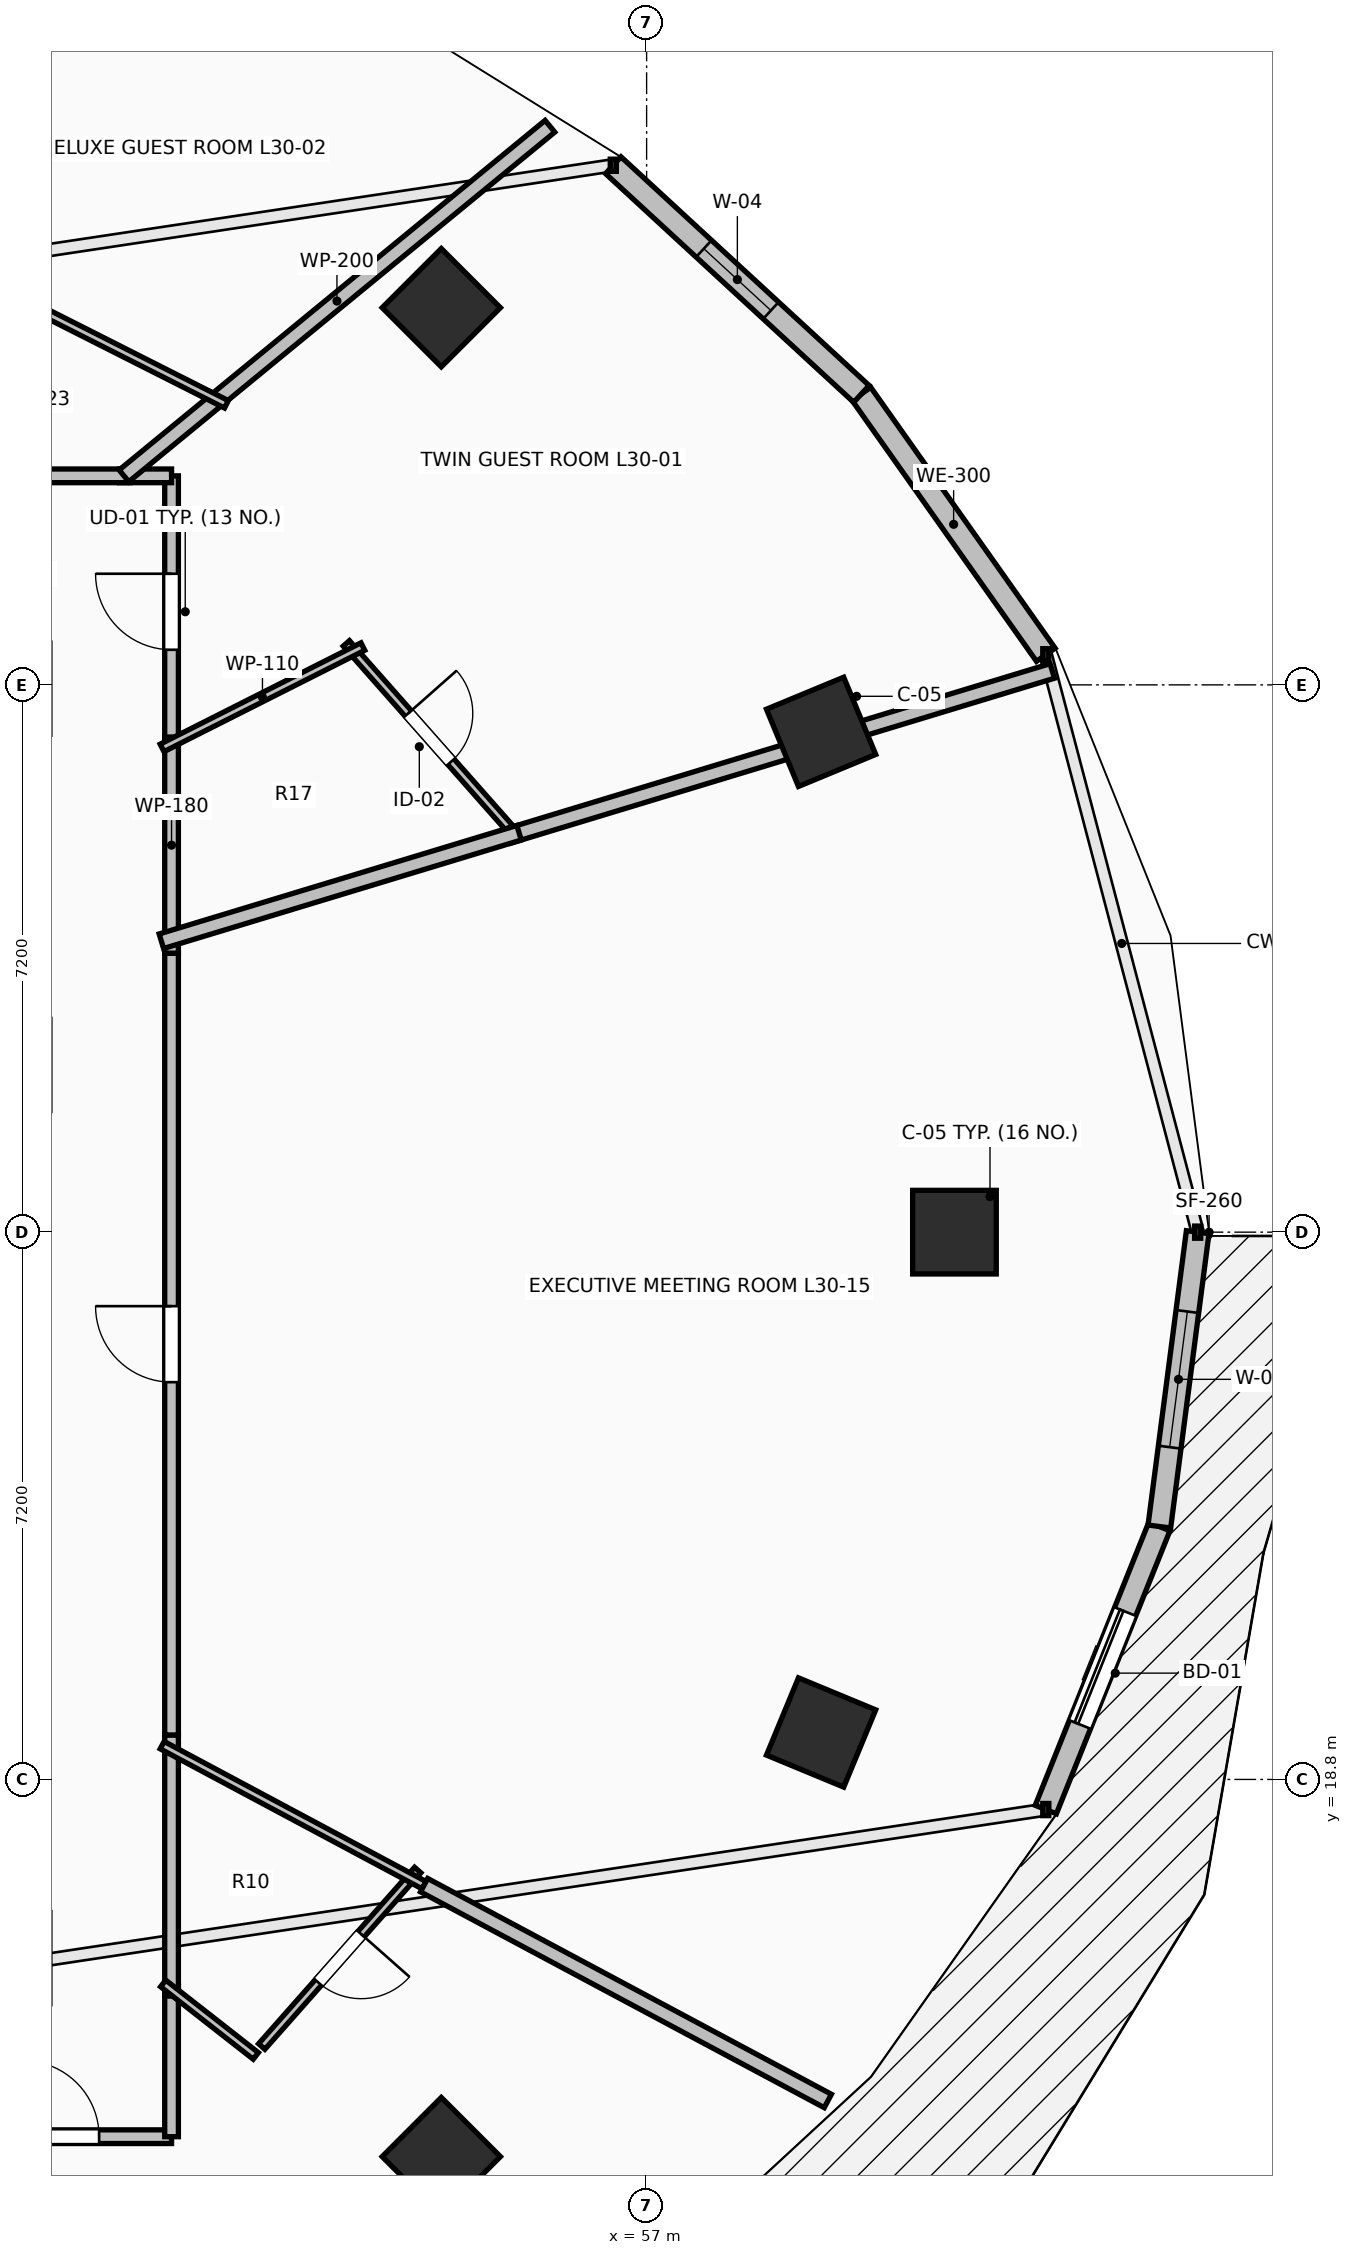
"""IFC4 building model, lengths in metres.
Left out: names, types, materials, properties, quantities, classifications, styles, units other than length and angle.
Written with IfcOpenShell. Run it as: python <this file> out.ifc"""

import sys

from ifc_helpers import new_model, si_unit, direction, frame, frame_2d, origin, origin_2d, place, context, subcontext, project, spatial, rectangle, extrude, element, fill, save


model = new_model("IFC4")
c1 = context("Model", 3, precision=1e-05, world=origin(), true_north=direction((0.0, 1.0)))
c2 = subcontext(c1, "Body", "Model", "MODEL_VIEW")
j1 = project(units=[si_unit("LENGTHUNIT", "METRE"), si_unit("PLANEANGLEUNIT", "RADIAN")], contexts=[c1])
p1 = place(None, origin())
s1 = spatial("IfcSite", under=j1, at=p1, CompositionType="ELEMENT")
p2 = place(p1, origin())
s2 = spatial("IfcBuilding", under=s1, at=p2, CompositionType="ELEMENT")
p3 = place(p2, frame((0.0, 0.0, 113.8)))
s3 = spatial("IfcBuildingStorey", under=s2, at=p3, CompositionType="ELEMENT", Elevation=113.8)
for number, where, z_axis, x_axis in (
    (1, (61.05, 26.0, 0.0), (0.0, 0.0, 1.0), (1.0, 0.0, 0.0)),
    (2, (59.295, 32.582, 0.0), (0.0, 0.0, 1.0), (0.924, 0.383, 0.0)),
    (3, (54.299, 38.162, 0.0), (0.0, 0.0, 1.0), (0.707, 0.707, 0.0)),
    (4, (54.299, 13.838, 0.0), (0.0, 0.0, 1.0), (0.707, -0.707, 0.0)),
    (5, (59.295, 19.418, 0.0), (0.0, 0.0, 1.0), (0.924, -0.383, 0.0)),
):
    element("IfcColumn", number, at=place(p3, frame(where, z_axis=z_axis, x_axis=x_axis)), inside=s3, PredefinedType="COLUMN", context=c2, shape_type="SweptSolid", body=[
        extrude(rectangle(XDim=1.1, YDim=1.1, at=origin_2d()), origin(), (0.0, 0.0, 1.0), 3.5),
    ])
p4 = place(p3, frame((62.252, 33.596, 0.0), z_axis=(0.0, 0.0, 1.0), x_axis=(-0.57716435238, 0.81662801222, 0.0)))
e6 = element("IfcWall", 6, at=p4, inside=s3, PredefinedType="STANDARD", context=c2, shape_type="SweptSolid", body=[
    extrude(rectangle(XDim=4.202, YDim=0.3, at=frame_2d((2.101, 0.0))), origin(), (0.0, 0.0, 1.0), 3.24),
])
p5 = place(p3, frame((59.826, 37.028, 0.0), z_axis=(0.0, 0.0, 1.0), x_axis=(-0.735416718093, 0.677615119924, 0.0)))
e7 = element("IfcWall", 7, at=p5, inside=s3, PredefinedType="STANDARD", context=c2, shape_type="SweptSolid", body=[
    extrude(rectangle(XDim=4.439, YDim=0.3, at=frame_2d((2.22, 0.0))), origin(), (0.0, 0.0, 1.0), 3.24),
])
p6 = place(p5, frame((1.619, 0.0, 0.85)))
e8 = element("IfcOpeningElement", 8, at=p6, cuts=e7, PredefinedType="OPENING", context=c2, shape_type="SweptSolid", body=[
    extrude(rectangle(XDim=1.2, YDim=1.95, at=frame_2d((0.6, 0.975))), frame((0.0, 0.165, 0.0), z_axis=(0.0, -1.0, 0.0), x_axis=(1.0, 0.0, 0.0)), (0.0, 0.0, 1.0), 0.33),
])
p7 = place(p3, frame((62.252, 18.404, 0.0), z_axis=(0.0, 0.0, 1.0), x_axis=(0.372345205928, 0.92809430966, 0.0)))
e9 = element("IfcWall", 9, at=p7, inside=s3, PredefinedType="STANDARD", context=c2, shape_type="SweptSolid", body=[
    extrude(rectangle(XDim=4.012, YDim=0.3, at=frame_2d((2.006, 0.0))), origin(), (0.0, 0.0, 1.0), 3.24),
])
p8 = place(p7, frame((1.206, 0.0, 0.0)))
e10 = element("IfcOpeningElement", 10, at=p8, cuts=e9, PredefinedType="OPENING", context=c2, shape_type="SweptSolid", body=[
    extrude(rectangle(XDim=1.6, YDim=2.3, at=frame_2d((0.8, 1.15))), frame((0.0, 0.165, 0.0), z_axis=(0.0, -1.0, 0.0), x_axis=(1.0, 0.0, 0.0)), (0.0, 0.0, 1.0), 0.33),
])
p9 = place(p3, frame((63.746, 22.127, 0.0), z_axis=(0.0, 0.0, 1.0), x_axis=(0.129157444793, 0.991624099372, 0.0)))
e11 = element("IfcWall", 11, at=p9, inside=s3, PredefinedType="STANDARD", context=c2, shape_type="SweptSolid", body=[
    extrude(rectangle(XDim=3.905, YDim=0.3, at=frame_2d((1.953, 0.0))), origin(), (0.0, 0.0, 1.0), 3.24),
])
p10 = place(p9, frame((1.052, 0.0, 0.85)))
e12 = element("IfcOpeningElement", 12, at=p10, cuts=e11, PredefinedType="OPENING", context=c2, shape_type="SweptSolid", body=[
    extrude(rectangle(XDim=1.8, YDim=2.19, at=frame_2d((0.9, 1.095))), frame((0.0, 0.165, 0.0), z_axis=(0.0, -1.0, 0.0), x_axis=(1.0, 0.0, 0.0)), (0.0, 0.0, 1.0), 0.33),
])
p11 = place(p3, frame((50.75, 32.374, 0.0), z_axis=(0.0, 0.0, 1.0), x_axis=(0.0, 1.0, 0.0)))
e13 = element("IfcWall", 13, at=p11, inside=s3, PredefinedType="PARTITIONING", context=c2, shape_type="SweptSolid", body=[
    extrude(rectangle(XDim=3.576, YDim=0.18, at=frame_2d((1.788, 0.0))), origin(), (0.0, 0.0, 1.0), 2.432),
])
p12 = place(p11, frame((1.288, 0.0, 0.0)))
e14 = element("IfcOpeningElement", 14, at=p12, cuts=e13, PredefinedType="OPENING", context=c2, shape_type="SweptSolid", body=[
    extrude(rectangle(XDim=1.0, YDim=2.15, at=frame_2d((0.5, 1.075))), frame((0.0, 0.105, 0.0), z_axis=(0.0, -1.0, 0.0), x_axis=(1.0, 0.0, 0.0)), (0.0, 0.0, 1.0), 0.21),
])
p13 = place(p3, frame((50.75, 35.95, 0.0), z_axis=(0.0, 0.0, 1.0), x_axis=(-1.0, 0.0, 0.0)))
e15 = element("IfcWall", 15, at=p13, inside=s3, PredefinedType="PARTITIONING", context=c2, shape_type="SweptSolid", body=[
    extrude(rectangle(XDim=0.686, YDim=0.18, at=frame_2d((0.343, 0.0))), origin(), (0.0, 0.0, 1.0), 3.24),
])
p14 = place(p3, frame((50.75, 29.668, 0.0), z_axis=(0.0, 0.0, 1.0), x_axis=(0.0, 1.0, 0.0)))
e16 = element("IfcWall", 16, at=p14, inside=s3, PredefinedType="PARTITIONING", context=c2, shape_type="SweptSolid", body=[
    extrude(rectangle(XDim=2.846, YDim=0.18, at=frame_2d((1.423, 0.0))), origin(), (0.0, 0.0, 1.0), 3.24),
])
p15 = place(p3, frame((50.204, 35.95, 0.0), z_axis=(0.0, 0.0, 1.0), x_axis=(-1.0, 0.0, 0.0)))
e17 = element("IfcWall", 17, at=p15, inside=s3, PredefinedType="PARTITIONING", context=c2, shape_type="SweptSolid", body=[
    extrude(rectangle(XDim=3.699, YDim=0.18, at=frame_2d((1.85, 0.0))), origin(), (0.0, 0.0, 1.0), 2.432),
])
p16 = place(p3, frame((47.844, 14.1, 0.0), z_axis=(0.0, 0.0, 1.0), x_axis=(1.0, 0.0, 0.0)))
e18 = element("IfcWall", 18, at=p16, inside=s3, PredefinedType="PARTITIONING", context=c2, shape_type="SweptSolid", body=[
    extrude(rectangle(XDim=2.906, YDim=0.18, at=frame_2d((1.453, 0.0))), origin(), (0.0, 0.0, 1.0), 2.432),
])
p17 = place(p16, frame((0.953, 0.0, 0.0)))
e19 = element("IfcOpeningElement", 19, at=p17, cuts=e18, PredefinedType="OPENING", context=c2, shape_type="SweptSolid", body=[
    extrude(rectangle(XDim=1.0, YDim=2.15, at=frame_2d((0.5, 1.075))), frame((0.0, 0.105, 0.0), z_axis=(0.0, -1.0, 0.0), x_axis=(1.0, 0.0, 0.0)), (0.0, 0.0, 1.0), 0.21),
])
p18 = place(p3, frame((50.75, 14.1, 0.0), z_axis=(0.0, 0.0, 1.0), x_axis=(0.0, 1.0, 0.0)))
e20 = element("IfcWall", 20, at=p18, inside=s3, PredefinedType="PARTITIONING", context=c2, shape_type="SweptSolid", body=[
    extrude(rectangle(XDim=1.99, YDim=0.18, at=frame_2d((0.995, 0.0))), origin(), (0.0, 0.0, 1.0), 2.432),
])
p19 = place(p3, frame((50.75, 15.95, 0.0), z_axis=(0.0, 0.0, 1.0), x_axis=(0.0, 1.0, 0.0)))
e21 = element("IfcWall", 21, at=p19, inside=s3, PredefinedType="PARTITIONING", context=c2, shape_type="SweptSolid", body=[
    extrude(rectangle(XDim=3.435, YDim=0.18, at=frame_2d((1.718, 0.0))), origin(), (0.0, 0.0, 1.0), 2.929),
])
p20 = place(p3, frame((50.75, 19.385, 0.0), z_axis=(0.0, 0.0, 1.0), x_axis=(0.0, 1.0, 0.0)))
e22 = element("IfcWall", 22, at=p20, inside=s3, PredefinedType="PARTITIONING", context=c2, shape_type="SweptSolid", body=[
    extrude(rectangle(XDim=10.283, YDim=0.18, at=frame_2d((5.142, 0.0))), origin(), (0.0, 0.0, 1.0), 2.432),
])
p21 = place(p20, frame((4.642, 0.0, 0.0)))
e23 = element("IfcOpeningElement", 23, at=p21, cuts=e22, PredefinedType="OPENING", context=c2, shape_type="SweptSolid", body=[
    extrude(rectangle(XDim=1.0, YDim=2.15, at=frame_2d((0.5, 1.075))), frame((0.0, 0.105, 0.0), z_axis=(0.0, -1.0, 0.0), x_axis=(1.0, 0.0, 0.0)), (0.0, 0.0, 1.0), 0.21),
])
p22 = place(p3, frame((53.049, 33.746, 0.0), z_axis=(0.0, 0.0, 1.0), x_axis=(0.662033979608, -0.749473821988, 0.0)))
e24 = element("IfcWall", 24, at=p22, inside=s3, PredefinedType="PARTITIONING", context=c2, shape_type="SweptSolid", body=[
    extrude(rectangle(XDim=3.309, YDim=0.11, at=frame_2d((1.654, 0.0))), origin(), (0.0, 0.0, 1.0), 2.432),
])
p23 = place(p22, frame((1.229, 0.0, 0.0)))
e25 = element("IfcOpeningElement", 25, at=p23, cuts=e24, PredefinedType="OPENING", context=c2, shape_type="SweptSolid", body=[
    extrude(rectangle(XDim=0.85, YDim=2.1, at=frame_2d((0.425, 1.05))), frame((0.0, 0.07, 0.0), z_axis=(0.0, -1.0, 0.0), x_axis=(1.0, 0.0, 0.0)), (0.0, 0.0, 1.0), 0.14),
])
p24 = place(p3, frame((50.625, 32.371, 0.0), z_axis=(0.0, 0.0, 1.0), x_axis=(0.892771184856, 0.450510389992, 0.0)))
e26 = element("IfcWall", 26, at=p24, inside=s3, PredefinedType="PARTITIONING", context=c2, shape_type="SweptSolid", body=[
    extrude(rectangle(XDim=2.959, YDim=0.11, at=frame_2d((1.48, 0.0))), origin(), (0.0, 0.0, 1.0), 2.432),
])
p25 = place(p3, frame((55.728, 40.549, 0.0), z_axis=(0.0, 0.0, 1.0), x_axis=(-0.773008157237, -0.634396081991, 0.0)))
e27 = element("IfcWall", 27, at=p25, inside=s3, PredefinedType="PARTITIONING", context=c2, shape_type="SweptSolid", body=[
    extrude(rectangle(XDim=7.25, YDim=0.2, at=frame_2d((3.625, 0.0))), origin(), (0.0, 0.0, 1.0), 2.677),
])
p26 = place(p3, frame((55.188, 31.214, 0.0), z_axis=(0.0, 0.0, 1.0), x_axis=(0.956927603812, 0.290326645457, 0.0)))
e28 = element("IfcWall", 28, at=p26, inside=s3, PredefinedType="PARTITIONING", context=c2, shape_type="SweptSolid", body=[
    extrude(rectangle(XDim=7.471, YDim=0.2, at=frame_2d((3.735, 0.0))), origin(), (0.0, 0.0, 1.0), 2.886),
])
p27 = place(p3, frame((50.616, 29.827, 0.0), z_axis=(0.0, 0.0, 1.0), x_axis=(0.956958408929, 0.290225091232, 0.0)))
e29 = element("IfcWall", 29, at=p27, inside=s3, PredefinedType="PARTITIONING", context=c2, shape_type="SweptSolid", body=[
    extrude(rectangle(XDim=4.918, YDim=0.2, at=frame_2d((2.459, 0.0))), origin(), (0.0, 0.0, 1.0), 2.929),
])
p28 = place(p3, frame((48.493, 38.396, 0.0), z_axis=(0.0, 0.0, 1.0), x_axis=(0.892546772035, -0.450954831142, 0.0)))
e30 = element("IfcWall", 30, at=p28, inside=s3, PredefinedType="PARTITIONING", context=c2, shape_type="SweptSolid", body=[
    extrude(rectangle(XDim=3.338, YDim=0.11, at=frame_2d((1.669, 0.0))), origin(), (0.0, 0.0, 1.0), 2.886),
])
p29 = place(p3, frame((51.802, 9.182, 0.0), z_axis=(0.0, 0.0, 1.0), x_axis=(-0.634357186002, 0.773040076948, 0.0)))
e31 = element("IfcWall", 31, at=p29, inside=s3, PredefinedType="PARTITIONING", context=c2, shape_type="SweptSolid", body=[
    extrude(rectangle(XDim=6.362, YDim=0.2, at=frame_2d((3.181, 0.0))), origin(), (0.0, 0.0, 1.0), 2.432),
])
p30 = place(p3, frame((53.989, 17.608, 0.0), z_axis=(0.0, 0.0, 1.0), x_axis=(-0.662322264705, -0.749219071885, 0.0)))
e32 = element("IfcWall", 32, at=p30, inside=s3, PredefinedType="PARTITIONING", context=c2, shape_type="SweptSolid", body=[
    extrude(rectangle(XDim=3.099, YDim=0.11, at=frame_2d((1.549, 0.0))), origin(), (0.0, 0.0, 1.0), 2.886),
])
p31 = place(p30, frame((1.125, 0.0, 0.0)))
e33 = element("IfcOpeningElement", 33, at=p31, cuts=e32, PredefinedType="OPENING", context=c2, shape_type="SweptSolid", body=[
    extrude(rectangle(XDim=0.85, YDim=2.1, at=frame_2d((0.425, 1.05))), frame((0.0, 0.07, 0.0), z_axis=(0.0, -1.0, 0.0), x_axis=(1.0, 0.0, 0.0)), (0.0, 0.0, 1.0), 0.14),
])
p32 = place(p3, frame((51.858, 15.163, 0.0), z_axis=(0.0, 0.0, 1.0), x_axis=(-0.787564922247, 0.61623168796, 0.0)))
e34 = element("IfcWall", 34, at=p32, inside=s3, PredefinedType="PARTITIONING", context=c2, shape_type="SweptSolid", body=[
    extrude(rectangle(XDim=1.548, YDim=0.11, at=frame_2d((0.774, 0.0))), origin(), (0.0, 0.0, 1.0), 2.432),
])
p33 = place(p3, frame((54.073, 17.409, 0.0), z_axis=(0.0, 0.0, 1.0), x_axis=(-0.881911515214, 0.47141497572, 0.0)))
e35 = element("IfcWall", 35, at=p33, inside=s3, PredefinedType="PARTITIONING", context=c2, shape_type="SweptSolid", body=[
    extrude(rectangle(XDim=3.907, YDim=0.11, at=frame_2d((1.954, 0.0))), origin(), (0.0, 0.0, 1.0), 2.886),
])
p34 = place(p3, frame((59.384, 14.57, 0.0), z_axis=(0.0, 0.0, 1.0), x_axis=(-0.881918302895, 0.471402277274, 0.0)))
e36 = element("IfcWall", 36, at=p34, inside=s3, PredefinedType="PARTITIONING", context=c2, shape_type="SweptSolid", body=[
    extrude(rectangle(XDim=6.023, YDim=0.2, at=frame_2d((3.011, 0.0))), origin(), (0.0, 0.0, 1.0), 2.677),
])
p35 = place(p8, origin())
e37 = element("IfcDoor", 37, at=p35, inside=s3, OperationType="SLIDING_TO_LEFT", PredefinedType="DOOR", context=c2, shape_type="SweptSolid", body=[
    extrude(rectangle(XDim=1.6, YDim=2.3, at=frame_2d((0.8, 1.15))), frame((0.0, 0.025, 0.0), z_axis=(0.0, -1.0, 0.0), x_axis=(1.0, 0.0, 0.0)), (0.0, 0.0, 1.0), 0.05),
])
fill(e10, e37)
p36 = place(p6, origin())
e38 = element("IfcWindow", 38, at=p36, inside=s3, PartitioningType="SINGLE_PANEL", PredefinedType="WINDOW", context=c2, shape_type="SweptSolid", body=[
    extrude(rectangle(XDim=1.2, YDim=1.95, at=frame_2d((0.6, 0.975))), frame((0.0, 0.03, 0.0), z_axis=(0.0, -1.0, 0.0), x_axis=(1.0, 0.0, 0.0)), (0.0, 0.0, 1.0), 0.06),
])
fill(e8, e38)
p37 = place(p10, origin())
e39 = element("IfcWindow", 39, at=p37, inside=s3, PartitioningType="SINGLE_PANEL", PredefinedType="WINDOW", context=c2, shape_type="SweptSolid", body=[
    extrude(rectangle(XDim=1.8, YDim=2.19, at=frame_2d((0.9, 1.095))), frame((0.0, 0.03, 0.0), z_axis=(0.0, -1.0, 0.0), x_axis=(1.0, 0.0, 0.0)), (0.0, 0.0, 1.0), 0.06),
])
fill(e12, e39)
p38 = place(p12, origin())
e40 = element("IfcDoor", 40, at=p38, inside=s3, OperationType="SINGLE_SWING_RIGHT", PredefinedType="DOOR", context=c2, shape_type="SweptSolid", body=[
    extrude(rectangle(XDim=1.0, YDim=2.15, at=frame_2d((0.5, 1.075))), frame((0.0, 0.025, 0.0), z_axis=(0.0, -1.0, 0.0), x_axis=(1.0, 0.0, 0.0)), (0.0, 0.0, 1.0), 0.05),
])
fill(e14, e40)
p39 = place(p17, origin())
e41 = element("IfcDoor", 41, at=p39, inside=s3, OperationType="SINGLE_SWING_LEFT", PredefinedType="DOOR", context=c2, shape_type="SweptSolid", body=[
    extrude(rectangle(XDim=1.0, YDim=2.15, at=frame_2d((0.5, 1.075))), frame((0.0, 0.025, 0.0), z_axis=(0.0, -1.0, 0.0), x_axis=(1.0, 0.0, 0.0)), (0.0, 0.0, 1.0), 0.05),
])
fill(e19, e41)
p40 = place(p21, origin())
e42 = element("IfcDoor", 42, at=p40, inside=s3, OperationType="SINGLE_SWING_RIGHT", PredefinedType="DOOR", context=c2, shape_type="SweptSolid", body=[
    extrude(rectangle(XDim=1.0, YDim=2.15, at=frame_2d((0.5, 1.075))), frame((0.0, 0.025, 0.0), z_axis=(0.0, -1.0, 0.0), x_axis=(1.0, 0.0, 0.0)), (0.0, 0.0, 1.0), 0.05),
])
fill(e23, e42)
p41 = place(p23, origin())
e43 = element("IfcDoor", 43, at=p41, inside=s3, OperationType="SINGLE_SWING_LEFT", PredefinedType="DOOR", context=c2, shape_type="SweptSolid", body=[
    extrude(rectangle(XDim=0.85, YDim=2.1, at=frame_2d((0.425, 1.05))), frame((0.0, 0.025, 0.0), z_axis=(0.0, -1.0, 0.0), x_axis=(1.0, 0.0, 0.0)), (0.0, 0.0, 1.0), 0.05),
])
fill(e25, e43)
p42 = place(p31, origin())
e44 = element("IfcDoor", 44, at=p42, inside=s3, OperationType="SINGLE_SWING_LEFT", PredefinedType="DOOR", context=c2, shape_type="SweptSolid", body=[
    extrude(rectangle(XDim=0.85, YDim=2.1, at=frame_2d((0.425, 1.05))), frame((0.0, 0.025, 0.0), z_axis=(0.0, -1.0, 0.0), x_axis=(1.0, 0.0, 0.0)), (0.0, 0.0, 1.0), 0.05),
])
fill(e33, e44)
save(model, sys.argv[1])
